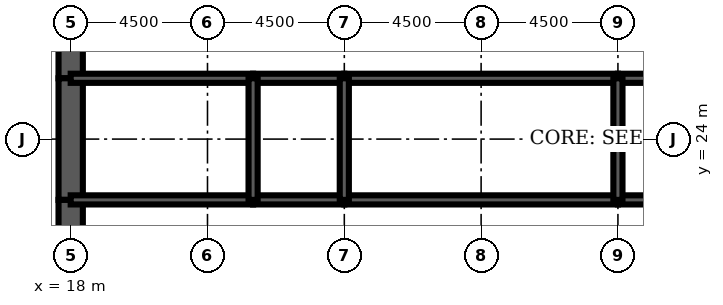
"""IFC4 building model, lengths in metres.
Left out: names, types, materials, properties, quantities, classifications, styles, units other than length and angle.
Written with IfcOpenShell. Run it as: python <this file> out.ifc"""

import sys

from ifc_helpers import new_model, si_unit, direction, frame, frame_2d, origin, place, context, subcontext, project, spatial, rectangle, extrude, element, fill, save


model = new_model("IFC4")
c1 = context("Model", 3, precision=1e-05, world=origin(), true_north=direction((0.0, 1.0)))
c2 = subcontext(c1, "Body", "Model", "MODEL_VIEW")
j1 = project(units=[si_unit("LENGTHUNIT", "METRE"), si_unit("PLANEANGLEUNIT", "RADIAN")], contexts=[c1])
p1 = place(None, origin())
s1 = spatial("IfcSite", under=j1, at=p1, CompositionType="ELEMENT")
p2 = place(p1, origin())
s2 = spatial("IfcBuilding", under=s1, at=p2, CompositionType="ELEMENT")
p3 = place(p2, frame((0.0, 0.0, 232.0)))
s3 = spatial("IfcBuildingStorey", under=s2, at=p3, CompositionType="ELEMENT", Elevation=232.0)
p4 = place(p3, frame((18.0, 28.8, 0.0), z_axis=(0.0, 0.0, 1.0), x_axis=(0.0, -1.0, 0.0)))
e1 = element("IfcWall", 1, at=p4, inside=s3, PredefinedType="SHEAR", context=c2, shape_type="SweptSolid", body=[
    extrude(rectangle(XDim=2.8, YDim=0.8, at=frame_2d((1.4, 0.0))), origin(), (0.0, 0.0, 1.0), 4.2),
])
p5 = place(p4, frame((0.4, 0.0, 0.0)))
e2 = element("IfcOpeningElement", 2, at=p5, cuts=e1, PredefinedType="OPENING", context=c2, shape_type="SweptSolid", body=[
    extrude(rectangle(XDim=1.8, YDim=2.1, at=frame_2d((0.9, 1.05))), frame((0.0, 0.41, 0.0), z_axis=(0.0, -1.0, 0.0), x_axis=(1.0, 0.0, 0.0)), (0.0, 0.0, 1.0), 0.82),
])
p6 = place(p3, frame((18.0, 26.0, 0.0), z_axis=(0.0, 0.0, 1.0), x_axis=(0.0, -1.0, 0.0)))
e3 = element("IfcWall", 3, at=p6, inside=s3, PredefinedType="SHEAR", context=c2, shape_type="SweptSolid", body=[
    extrude(rectangle(XDim=4.0, YDim=0.8, at=frame_2d((2.0, 0.0))), origin(), (0.0, 0.0, 1.0), 4.2),
])
p7 = place(p3, frame((18.0, 22.0, 0.0), z_axis=(0.0, 0.0, 1.0), x_axis=(0.0, -1.0, 0.0)))
e4 = element("IfcWall", 4, at=p7, inside=s3, PredefinedType="SHEAR", context=c2, shape_type="SweptSolid", body=[
    extrude(rectangle(XDim=2.8, YDim=0.8, at=frame_2d((1.4, 0.0))), origin(), (0.0, 0.0, 1.0), 4.2),
])
p8 = place(p7, frame((0.6, 0.0, 0.0)))
e5 = element("IfcOpeningElement", 5, at=p8, cuts=e4, PredefinedType="OPENING", context=c2, shape_type="SweptSolid", body=[
    extrude(rectangle(XDim=1.8, YDim=2.1, at=frame_2d((0.9, 1.05))), frame((0.0, 0.41, 0.0), z_axis=(0.0, -1.0, 0.0), x_axis=(1.0, 0.0, 0.0)), (0.0, 0.0, 1.0), 0.82),
])
p9 = place(p3, frame((18.0, 22.0, 0.0), z_axis=(0.0, 0.0, 1.0), x_axis=(1.0, 0.0, 0.0)))
e6 = element("IfcWall", 6, at=p9, inside=s3, PredefinedType="SOLIDWALL", context=c2, shape_type="SweptSolid", body=[
    extrude(rectangle(XDim=6.0, YDim=0.3, at=frame_2d((3.0, 0.0))), origin(), (0.0, 0.0, 1.0), 4.2),
])
p10 = place(p9, frame((4.4, 0.0, 0.0)))
e7 = element("IfcOpeningElement", 7, at=p10, cuts=e6, PredefinedType="OPENING", context=c2, shape_type="SweptSolid", body=[
    extrude(rectangle(XDim=1.0, YDim=2.1, at=frame_2d((0.5, 1.05))), frame((0.0, 0.16, 0.0), z_axis=(0.0, -1.0, 0.0), x_axis=(1.0, 0.0, 0.0)), (0.0, 0.0, 1.0), 0.32),
])
p11 = place(p9, frame((0.8, 0.0, 0.0)))
e8 = element("IfcOpeningElement", 8, at=p11, cuts=e6, PredefinedType="OPENING", context=c2, shape_type="SweptSolid", body=[
    extrude(rectangle(XDim=1.0, YDim=2.1, at=frame_2d((0.5, 1.05))), frame((0.0, 0.16, 0.0), z_axis=(0.0, -1.0, 0.0), x_axis=(1.0, 0.0, 0.0)), (0.0, 0.0, 1.0), 0.32),
])
p12 = place(p3, frame((24.0, 22.0, 0.0), z_axis=(0.0, 0.0, 1.0), x_axis=(1.0, 0.0, 0.0)))
e9 = element("IfcWall", 9, at=p12, inside=s3, PredefinedType="SOLIDWALL", context=c2, shape_type="SweptSolid", body=[
    extrude(rectangle(XDim=3.0, YDim=0.3, at=frame_2d((1.5, 0.0))), origin(), (0.0, 0.0, 1.0), 4.2),
])
p13 = place(p12, frame((1.0, 0.0, 0.0)))
e10 = element("IfcOpeningElement", 10, at=p13, cuts=e9, PredefinedType="OPENING", context=c2, shape_type="SweptSolid", body=[
    extrude(rectangle(XDim=1.0, YDim=2.1, at=frame_2d((0.5, 1.05))), frame((0.0, 0.16, 0.0), z_axis=(0.0, -1.0, 0.0), x_axis=(1.0, 0.0, 0.0)), (0.0, 0.0, 1.0), 0.32),
])
p14 = place(p3, frame((27.0, 22.0, 0.0), z_axis=(0.0, 0.0, 1.0), x_axis=(1.0, 0.0, 0.0)))
e11 = element("IfcWall", 11, at=p14, inside=s3, PredefinedType="SOLIDWALL", context=c2, shape_type="SweptSolid", body=[
    extrude(rectangle(XDim=9.0, YDim=0.3, at=frame_2d((4.5, 0.0))), origin(), (0.0, 0.0, 1.0), 4.2),
])
p15 = place(p14, frame((4.0, 0.0, 0.0)))
e12 = element("IfcOpeningElement", 12, at=p15, cuts=e11, PredefinedType="OPENING", context=c2, shape_type="SweptSolid", body=[
    extrude(rectangle(XDim=1.0, YDim=2.1, at=frame_2d((0.5, 1.05))), frame((0.0, 0.16, 0.0), z_axis=(0.0, -1.0, 0.0), x_axis=(1.0, 0.0, 0.0)), (0.0, 0.0, 1.0), 0.32),
])
p16 = place(p3, frame((36.0, 22.0, 0.0), z_axis=(0.0, 0.0, 1.0), x_axis=(1.0, 0.0, 0.0)))
e13 = element("IfcWall", 13, at=p16, inside=s3, PredefinedType="SOLIDWALL", context=c2, shape_type="SweptSolid", body=[
    extrude(rectangle(XDim=9.0, YDim=0.3, at=frame_2d((4.5, 0.0))), origin(), (0.0, 0.0, 1.0), 4.2),
])
p17 = place(p16, frame((4.0, 0.0, 0.0)))
e14 = element("IfcOpeningElement", 14, at=p17, cuts=e13, PredefinedType="OPENING", context=c2, shape_type="SweptSolid", body=[
    extrude(rectangle(XDim=1.0, YDim=2.1, at=frame_2d((0.5, 1.05))), frame((0.0, 0.16, 0.0), z_axis=(0.0, -1.0, 0.0), x_axis=(1.0, 0.0, 0.0)), (0.0, 0.0, 1.0), 0.32),
])
p18 = place(p3, frame((18.0, 26.0, 0.0), z_axis=(0.0, 0.0, 1.0), x_axis=(1.0, 0.0, 0.0)))
e15 = element("IfcWall", 15, at=p18, inside=s3, PredefinedType="SOLIDWALL", context=c2, shape_type="SweptSolid", body=[
    extrude(rectangle(XDim=6.0, YDim=0.3, at=frame_2d((3.0, 0.0))), origin(), (0.0, 0.0, 1.0), 4.2),
])
p19 = place(p3, frame((24.0, 26.0, 0.0), z_axis=(0.0, 0.0, 1.0), x_axis=(1.0, 0.0, 0.0)))
e16 = element("IfcWall", 16, at=p19, inside=s3, PredefinedType="SOLIDWALL", context=c2, shape_type="SweptSolid", body=[
    extrude(rectangle(XDim=3.0, YDim=0.3, at=frame_2d((1.5, 0.0))), origin(), (0.0, 0.0, 1.0), 4.2),
])
for number, where, z_axis, x_axis in (
    (17, (27.0, 26.0, 0.0), (0.0, 0.0, 1.0), (1.0, 0.0, 0.0)),
    (18, (36.0, 26.0, 0.0), (0.0, 0.0, 1.0), (1.0, 0.0, 0.0)),
):
    element("IfcWall", number, at=place(p3, frame(where, z_axis=z_axis, x_axis=x_axis)), inside=s3, PredefinedType="SOLIDWALL", context=c2, shape_type="SweptSolid", body=[
        extrude(rectangle(XDim=9.0, YDim=0.3, at=frame_2d((4.5, 0.0))), origin(), (0.0, 0.0, 1.0), 4.2),
    ])
for number, where, z_axis, x_axis in (
    (19, (24.0, 22.0, 0.0), (0.0, 0.0, 1.0), (0.0, 1.0, 0.0)),
    (20, (27.0, 22.0, 0.0), (0.0, 0.0, 1.0), (0.0, 1.0, 0.0)),
    (21, (36.0, 22.0, 0.0), (0.0, 0.0, 1.0), (0.0, 1.0, 0.0)),
):
    element("IfcWall", number, at=place(p3, frame(where, z_axis=z_axis, x_axis=x_axis)), inside=s3, PredefinedType="SOLIDWALL", context=c2, shape_type="SweptSolid", body=[
        extrude(rectangle(XDim=4.0, YDim=0.3, at=frame_2d((2.0, 0.0))), origin(), (0.0, 0.0, 1.0), 4.2),
    ])
p20 = place(p3, frame((20.275, 22.15, 0.0), z_axis=(0.0, 0.0, 1.0), x_axis=(0.0, 1.0, 0.0)))
e22 = element("IfcWall", 22, at=p20, inside=s3, PredefinedType="PARTITIONING", context=c2, shape_type="SweptSolid", body=[
    extrude(rectangle(XDim=3.7, YDim=0.15, at=frame_2d((1.85, 0.0))), origin(), (0.0, 0.0, 1.0), 3.0),
])
p21 = place(p8, origin())
e23 = element("IfcDoor", 23, at=p21, inside=s3, OperationType="SINGLE_SWING_LEFT", PredefinedType="DOOR", context=c2, shape_type="SweptSolid", body=[
    extrude(rectangle(XDim=1.8, YDim=2.1, at=frame_2d((0.9, 1.05))), frame((0.0, 0.4, 0.0), z_axis=(0.0, -1.0, 0.0), x_axis=(1.0, 0.0, 0.0)), (0.0, 0.0, 1.0), 0.8),
])
fill(e5, e23)
p22 = place(p5, origin())
e24 = element("IfcDoor", 24, at=p22, inside=s3, OperationType="SINGLE_SWING_LEFT", PredefinedType="DOOR", context=c2, shape_type="SweptSolid", body=[
    extrude(rectangle(XDim=1.8, YDim=2.1, at=frame_2d((0.9, 1.05))), frame((0.0, 0.4, 0.0), z_axis=(0.0, -1.0, 0.0), x_axis=(1.0, 0.0, 0.0)), (0.0, 0.0, 1.0), 0.8),
])
fill(e2, e24)
p23 = place(p10, origin())
e25 = element("IfcDoor", 25, at=p23, inside=s3, OperationType="SINGLE_SWING_RIGHT", PredefinedType="DOOR", context=c2, shape_type="SweptSolid", body=[
    extrude(rectangle(XDim=1.0, YDim=2.1, at=frame_2d((0.5, 1.05))), frame((0.0, 0.025, 0.0), z_axis=(0.0, -1.0, 0.0), x_axis=(1.0, 0.0, 0.0)), (0.0, 0.0, 1.0), 0.05),
])
fill(e7, e25)
p24 = place(p13, origin())
e26 = element("IfcDoor", 26, at=p24, inside=s3, OperationType="SINGLE_SWING_LEFT", PredefinedType="DOOR", context=c2, shape_type="SweptSolid", body=[
    extrude(rectangle(XDim=1.0, YDim=2.1, at=frame_2d((0.5, 1.05))), frame((0.0, 0.025, 0.0), z_axis=(0.0, -1.0, 0.0), x_axis=(1.0, 0.0, 0.0)), (0.0, 0.0, 1.0), 0.05),
])
fill(e10, e26)
p25 = place(p15, origin())
e27 = element("IfcDoor", 27, at=p25, inside=s3, OperationType="SINGLE_SWING_LEFT", PredefinedType="DOOR", context=c2, shape_type="SweptSolid", body=[
    extrude(rectangle(XDim=1.0, YDim=2.1, at=frame_2d((0.5, 1.05))), frame((0.0, 0.025, 0.0), z_axis=(0.0, -1.0, 0.0), x_axis=(1.0, 0.0, 0.0)), (0.0, 0.0, 1.0), 0.05),
])
fill(e12, e27)
p26 = place(p11, origin())
e28 = element("IfcDoor", 28, at=p26, inside=s3, OperationType="SINGLE_SWING_LEFT", PredefinedType="DOOR", context=c2, shape_type="SweptSolid", body=[
    extrude(rectangle(XDim=1.0, YDim=2.1, at=frame_2d((0.5, 1.05))), frame((0.0, 0.025, 0.0), z_axis=(0.0, -1.0, 0.0), x_axis=(1.0, 0.0, 0.0)), (0.0, 0.0, 1.0), 0.05),
])
fill(e8, e28)
save(model, sys.argv[1])
